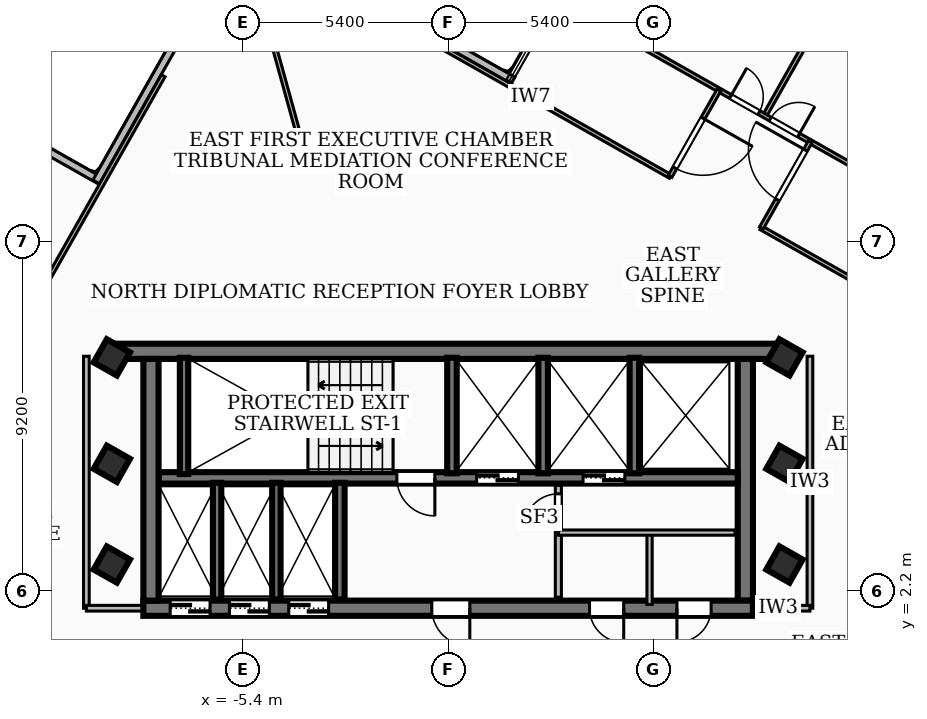
"""IFC4 building model, lengths in metres.
Left out: names, types, materials, properties, quantities, classifications, styles, units other than length and angle.
Written with IfcOpenShell. Run it as: python <this file> out.ifc"""

import sys

from ifc_helpers import new_model, si_unit, direction, frame, frame_2d, origin, origin_2d, place, context, subcontext, project, spatial, rectangle, extrude, element, fill, save


model = new_model("IFC4")
c1 = context("Model", 3, precision=1e-05, world=origin(), true_north=direction((0.0, 1.0)))
c2 = subcontext(c1, "Body", "Model", "MODEL_VIEW")
j1 = project(units=[si_unit("LENGTHUNIT", "METRE"), si_unit("PLANEANGLEUNIT", "RADIAN")], contexts=[c1])
p1 = place(None, origin())
s1 = spatial("IfcSite", under=j1, at=p1, CompositionType="ELEMENT")
p2 = place(p1, origin())
s2 = spatial("IfcBuilding", under=s1, at=p2, CompositionType="ELEMENT")
p3 = place(p2, frame((0.0, 0.0, 281.7)))
s3 = spatial("IfcBuildingStorey", under=s2, at=p3, CompositionType="ELEMENT", Elevation=281.7)
p4 = place(p3, frame((-8.78, 8.51, 0.0), z_axis=(0.0, 0.0, 1.0), x_axis=(1.0, 0.0, 0.0)))
e1 = element("IfcWall", 1, at=p4, inside=s3, PredefinedType="SHEAR", context=c2, shape_type="SweptSolid", body=[
    extrude(rectangle(XDim=17.56, YDim=0.4, at=frame_2d((8.78, 0.0))), origin(), (0.0, 0.0, 1.0), 3.12),
])
p5 = place(p3, frame((8.02, 1.75, 0.0), z_axis=(0.0, 0.0, 1.0), x_axis=(-1.0, 0.0, 0.0)))
e2 = element("IfcWall", 2, at=p5, inside=s3, PredefinedType="SHEAR", context=c2, shape_type="SweptSolid", body=[
    extrude(rectangle(XDim=16.04, YDim=0.4, at=frame_2d((8.02, 0.0))), origin(), (0.0, 0.0, 1.0), 3.12),
])
p6 = place(p5, frame((7.45, 0.0, 0.0)))
e3 = element("IfcOpeningElement", 3, at=p6, cuts=e2, PredefinedType="OPENING", context=c2, shape_type="SweptSolid", body=[
    extrude(rectangle(XDim=1.0, YDim=2.1, at=frame_2d((0.5, 1.05))), frame((0.0, 0.21, 0.0), z_axis=(0.0, -1.0, 0.0), x_axis=(1.0, 0.0, 0.0)), (0.0, 0.0, 1.0), 0.42),
])
p7 = place(p5, frame((14.285, 0.0, 0.0)))
e4 = element("IfcOpeningElement", 4, at=p7, cuts=e2, PredefinedType="OPENING", context=c2, shape_type="SweptSolid", body=[
    extrude(rectangle(XDim=1.05, YDim=2.15, at=frame_2d((0.525, 1.075))), frame((0.0, 0.21, 0.0), z_axis=(0.0, -1.0, 0.0), x_axis=(1.0, 0.0, 0.0)), (0.0, 0.0, 1.0), 0.42),
])
p8 = place(p5, frame((12.725, 0.0, 0.0)))
e5 = element("IfcOpeningElement", 5, at=p8, cuts=e2, PredefinedType="OPENING", context=c2, shape_type="SweptSolid", body=[
    extrude(rectangle(XDim=1.05, YDim=2.15, at=frame_2d((0.525, 1.075))), frame((0.0, 0.21, 0.0), z_axis=(0.0, -1.0, 0.0), x_axis=(1.0, 0.0, 0.0)), (0.0, 0.0, 1.0), 0.42),
])
p9 = place(p5, frame((11.165, 0.0, 0.0)))
e6 = element("IfcOpeningElement", 6, at=p9, cuts=e2, PredefinedType="OPENING", context=c2, shape_type="SweptSolid", body=[
    extrude(rectangle(XDim=1.05, YDim=2.15, at=frame_2d((0.525, 1.075))), frame((0.0, 0.21, 0.0), z_axis=(0.0, -1.0, 0.0), x_axis=(1.0, 0.0, 0.0)), (0.0, 0.0, 1.0), 0.42),
])
p10 = place(p5, frame((3.4, 0.0, 0.0)))
e7 = element("IfcOpeningElement", 7, at=p10, cuts=e2, PredefinedType="OPENING", context=c2, shape_type="SweptSolid", body=[
    extrude(rectangle(XDim=0.9, YDim=2.06, at=frame_2d((0.45, 1.03))), frame((0.0, 0.21, 0.0), z_axis=(0.0, -1.0, 0.0), x_axis=(1.0, 0.0, 0.0)), (0.0, 0.0, 1.0), 0.42),
])
p11 = place(p5, frame((1.1, 0.0, 0.0)))
e8 = element("IfcOpeningElement", 8, at=p11, cuts=e2, PredefinedType="OPENING", context=c2, shape_type="SweptSolid", body=[
    extrude(rectangle(XDim=0.9, YDim=2.06, at=frame_2d((0.45, 1.03))), frame((0.0, 0.21, 0.0), z_axis=(0.0, -1.0, 0.0), x_axis=(1.0, 0.0, 0.0)), (0.0, 0.0, 1.0), 0.42),
])
for number, where, z_axis, x_axis in (
    (9, (-7.82, 1.95, 0.0), (0.0, 0.0, 1.0), (0.0, 1.0, 0.0)),
    (10, (7.82, 8.31, 0.0), (0.0, 0.0, 1.0), (0.0, -1.0, 0.0)),
):
    element("IfcWall", number, at=place(p3, frame(where, z_axis=z_axis, x_axis=x_axis)), inside=s3, PredefinedType="SHEAR", context=c2, shape_type="SweptSolid", body=[
        extrude(rectangle(XDim=6.36, YDim=0.4, at=frame_2d((3.18, 0.0))), origin(), (0.0, 0.0, 1.0), 3.12),
    ])
p12 = place(p3, frame((7.62, 5.18, 0.0), z_axis=(0.0, 0.0, 1.0), x_axis=(-1.0, 0.0, 0.0)))
e11 = element("IfcWall", 11, at=p12, inside=s3, PredefinedType="SOLIDWALL", context=c2, shape_type="SweptSolid", body=[
    extrude(rectangle(XDim=15.24, YDim=0.3, at=frame_2d((7.62, 0.0))), origin(), (0.0, 0.0, 1.0), 3.12),
])
p13 = place(p12, frame((5.77, 0.0, 0.0)))
e12 = element("IfcOpeningElement", 12, at=p13, cuts=e11, PredefinedType="OPENING", context=c2, shape_type="SweptSolid", body=[
    extrude(rectangle(XDim=1.1, YDim=2.15, at=frame_2d((0.55, 1.075))), frame((0.0, 0.16, 0.0), z_axis=(0.0, -1.0, 0.0), x_axis=(1.0, 0.0, 0.0)), (0.0, 0.0, 1.0), 0.32),
])
p14 = place(p12, frame((2.97, 0.0, 0.0)))
e13 = element("IfcOpeningElement", 13, at=p14, cuts=e11, PredefinedType="OPENING", context=c2, shape_type="SweptSolid", body=[
    extrude(rectangle(XDim=1.1, YDim=2.15, at=frame_2d((0.55, 1.075))), frame((0.0, 0.16, 0.0), z_axis=(0.0, -1.0, 0.0), x_axis=(1.0, 0.0, 0.0)), (0.0, 0.0, 1.0), 0.32),
])
p15 = place(p12, frame((7.97, 0.0, 0.0)))
e14 = element("IfcOpeningElement", 14, at=p15, cuts=e11, PredefinedType="OPENING", context=c2, shape_type="SweptSolid", body=[
    extrude(rectangle(XDim=1.0, YDim=2.1, at=frame_2d((0.5, 1.05))), frame((0.0, 0.16, 0.0), z_axis=(0.0, -1.0, 0.0), x_axis=(1.0, 0.0, 0.0)), (0.0, 0.0, 1.0), 0.32),
])
p16 = place(p3, frame((-6.95, 5.28, 0.0), z_axis=(0.0, 0.0, 1.0), x_axis=(0.0, 1.0, 0.0)))
e15 = element("IfcWall", 15, at=p16, inside=s3, PredefinedType="SOLIDWALL", context=c2, shape_type="SweptSolid", body=[
    extrude(rectangle(XDim=3.06, YDim=0.22, at=frame_2d((1.53, 0.0))), origin(), (0.0, 0.0, 1.0), 3.12),
])
for number, where, z_axis, x_axis in (
    (16, (0.1, 5.3, 0.0), (0.0, 0.0, 1.0), (0.0, 1.0, 0.0)),
    (17, (2.5, 5.3, 0.0), (0.0, 0.0, 1.0), (0.0, 1.0, 0.0)),
    (18, (4.9, 5.3, 0.0), (0.0, 0.0, 1.0), (0.0, 1.0, 0.0)),
):
    element("IfcWall", number, at=place(p3, frame(where, z_axis=z_axis, x_axis=x_axis)), inside=s3, PredefinedType="SOLIDWALL", context=c2, shape_type="SweptSolid", body=[
        extrude(rectangle(XDim=3.04, YDim=0.25, at=frame_2d((1.52, 0.0))), origin(), (0.0, 0.0, 1.0), 3.12),
    ])
p17 = place(p3, frame((-2.85, 1.98, 0.0), z_axis=(0.0, 0.0, 1.0), x_axis=(0.0, 1.0, 0.0)))
e19 = element("IfcWall", 19, at=p17, inside=s3, PredefinedType="SOLIDWALL", context=c2, shape_type="SweptSolid", body=[
    extrude(rectangle(XDim=3.07, YDim=0.25, at=frame_2d((1.535, 0.0))), origin(), (0.0, 0.0, 1.0), 3.12),
])
for number, where, z_axis, x_axis in (
    (20, (-6.08, 1.98, 0.0), (0.0, 0.0, 1.0), (0.0, 1.0, 0.0)),
    (21, (-4.52, 1.98, 0.0), (0.0, 0.0, 1.0), (0.0, 1.0, 0.0)),
):
    element("IfcWall", number, at=place(p3, frame(where, z_axis=z_axis, x_axis=x_axis)), inside=s3, PredefinedType="SOLIDWALL", context=c2, shape_type="SweptSolid", body=[
        extrude(rectangle(XDim=3.07, YDim=0.22, at=frame_2d((1.535, 0.0))), origin(), (0.0, 0.0, 1.0), 3.12),
    ])
for number, where, z_axis, x_axis in (
    (22, (-8.85, 2.9, 0.0), (0.0, 0.0, 1.0), (0.493, 0.87, 0.0)),
    (23, (-8.85, 5.55, 0.0), (0.0, 0.0, 1.0), (0.493, 0.87, 0.0)),
    (24, (8.85, 2.9, 0.0), (0.0, 0.0, 1.0), (0.493, 0.87, 0.0)),
    (25, (8.85, 5.55, 0.0), (0.0, 0.0, 1.0), (0.493, 0.87, 0.0)),
    (26, (-8.85, 8.35, 0.0), (0.0, 0.0, 1.0), (0.493, 0.87, 0.0)),
    (27, (8.85, 8.35, 0.0), (0.0, 0.0, 1.0), (0.493, 0.87, 0.0)),
):
    element("IfcColumn", number, at=place(p3, frame(where, z_axis=z_axis, x_axis=x_axis)), inside=s3, PredefinedType="COLUMN", context=c2, shape_type="SweptSolid", body=[
        extrude(rectangle(XDim=0.7, YDim=0.7, at=origin_2d()), origin(), (0.0, 0.0, 1.0), 3.42),
    ])
p18 = place(p3, frame((-12.323, 14.792, 0.0), z_axis=(0.0, 0.0, 1.0), x_axis=(0.870412972764, -0.492322309918, 0.0)))
e28 = element("IfcWall", 28, at=p18, inside=s3, PredefinedType="SOLIDWALL", context=c2, shape_type="SweptSolid", body=[
    extrude(rectangle(XDim=3.642, YDim=0.2, at=frame_2d((1.821, 0.0))), origin(), (0.0, 0.0, 1.0), 3.12),
])
p19 = place(p3, frame((-9.262, 12.968, 0.0), z_axis=(0.0, 0.0, 1.0), x_axis=(0.492583125855, 0.87026539867, 0.0)))
e29 = element("IfcWall", 29, at=p19, inside=s3, PredefinedType="SOLIDWALL", context=c2, shape_type="SweptSolid", body=[
    extrude(rectangle(XDim=6.24, YDim=0.2, at=frame_2d((3.12, 0.0))), origin(), (0.0, 0.0, 1.0), 3.12),
])
p20 = place(p3, frame((-4.16, 18.96, 0.0), z_axis=(0.0, 0.0, 1.0), x_axis=(0.870345588147, -0.492441425139, 0.0)))
e30 = element("IfcWall", 30, at=p20, inside=s3, PredefinedType="SOLIDWALL", context=c2, shape_type="SweptSolid", body=[
    extrude(rectangle(XDim=6.742, YDim=0.2, at=frame_2d((3.371, 0.0))), origin(), (0.0, 0.0, 1.0), 3.12),
])
p21 = place(p3, frame((2.9, 2.04, 0.0), z_axis=(0.0, 0.0, 1.0), x_axis=(0.0, 1.0, 0.0)))
e31 = element("IfcWall", 31, at=p21, inside=s3, PredefinedType="PARTITIONING", context=c2, shape_type="SweptSolid", body=[
    extrude(rectangle(XDim=2.94, YDim=0.16, at=frame_2d((1.47, 0.0))), origin(), (0.0, 0.0, 1.0), 2.35),
])
p22 = place(p21, frame((1.82, 0.0, 0.0)))
e32 = element("IfcOpeningElement", 32, at=p22, cuts=e31, PredefinedType="OPENING", context=c2, shape_type="SweptSolid", body=[
    extrude(rectangle(XDim=0.9, YDim=2.06, at=frame_2d((0.45, 1.03))), frame((0.0, 0.09, 0.0), z_axis=(0.0, -1.0, 0.0), x_axis=(1.0, 0.0, 0.0)), (0.0, 0.0, 1.0), 0.18),
])
p23 = place(p3, frame((2.9, 3.74, 0.0), z_axis=(0.0, 0.0, 1.0), x_axis=(1.0, 0.0, 0.0)))
e33 = element("IfcWall", 33, at=p23, inside=s3, PredefinedType="PARTITIONING", context=c2, shape_type="SweptSolid", body=[
    extrude(rectangle(XDim=4.65, YDim=0.138, at=frame_2d((2.325, 0.0))), origin(), (0.0, 0.0, 1.0), 3.12),
])
p24 = place(p3, frame((5.3, 1.85, 0.0), z_axis=(0.0, 0.0, 1.0), x_axis=(0.0, 1.0, 0.0)))
e34 = element("IfcWall", 34, at=p24, inside=s3, PredefinedType="PARTITIONING", context=c2, shape_type="SweptSolid", body=[
    extrude(rectangle(XDim=1.89, YDim=0.138, at=frame_2d((0.945, 0.0))), origin(), (0.0, 0.0, 1.0), 2.35),
])
p25 = place(p3, frame((-9.52, 1.75, 0.0), z_axis=(0.0, 0.0, 1.0), x_axis=(0.0, 1.0, 0.0)))
e35 = element("IfcWall", 35, at=p25, inside=s3, PredefinedType="PARTITIONING", context=c2, shape_type="SweptSolid", body=[
    extrude(rectangle(XDim=6.63, YDim=0.15, at=frame_2d((3.315, 0.0))), origin(), (0.0, 0.0, 1.0), 2.49),
])
p26 = place(p3, frame((-7.85, 1.75, 0.0), z_axis=(0.0, 0.0, 1.0), x_axis=(-1.0, 0.0, 0.0)))
e36 = element("IfcWall", 36, at=p26, inside=s3, PredefinedType="PARTITIONING", context=c2, shape_type="SweptSolid", body=[
    extrude(rectangle(XDim=1.67, YDim=0.15, at=frame_2d((0.835, 0.0))), origin(), (0.0, 0.0, 1.0), 2.35),
])
p27 = place(p3, frame((9.52, 1.75, 0.0), z_axis=(0.0, 0.0, 1.0), x_axis=(0.0, 1.0, 0.0)))
e37 = element("IfcWall", 37, at=p27, inside=s3, PredefinedType="PARTITIONING", context=c2, shape_type="SweptSolid", body=[
    extrude(rectangle(XDim=6.63, YDim=0.15, at=frame_2d((3.315, 0.0))), origin(), (0.0, 0.0, 1.0), 3.12),
])
p28 = place(p3, frame((7.85, 1.75, 0.0), z_axis=(0.0, 0.0, 1.0), x_axis=(1.0, 0.0, 0.0)))
e38 = element("IfcWall", 38, at=p28, inside=s3, PredefinedType="PARTITIONING", context=c2, shape_type="SweptSolid", body=[
    extrude(rectangle(XDim=1.67, YDim=0.15, at=frame_2d((0.835, 0.0))), origin(), (0.0, 0.0, 1.0), 2.35),
])
p29 = place(p3, frame((-3.75, 13.54, 0.0), z_axis=(0.0, 0.0, 1.0), x_axis=(-0.266822842302, 0.963745594452, 0.0)))
e39 = element("IfcWall", 39, at=p29, inside=s3, PredefinedType="PARTITIONING", context=c2, shape_type="SweptSolid", body=[
    extrude(rectangle(XDim=5.645, YDim=0.11, at=frame_2d((2.822, 0.0))), origin(), (0.0, 0.0, 1.0), 3.12),
])
p30 = place(p3, frame((5.849, 13.11, 0.0), z_axis=(0.0, 0.0, 1.0), x_axis=(-0.870169207172, 0.49275303235, 0.0)))
e40 = element("IfcWall", 40, at=p30, inside=s3, PredefinedType="PARTITIONING", context=c2, shape_type="SweptSolid", body=[
    extrude(rectangle(XDim=8.45, YDim=0.11, at=frame_2d((4.225, 0.0))), origin(), (0.0, 0.0, 1.0), 3.12),
])
p31 = place(p3, frame((15.152, 7.843, 0.0), z_axis=(0.0, 0.0, 1.0), x_axis=(-0.87023152106, 0.492642973921, 0.0)))
e41 = element("IfcWall", 41, at=p31, inside=s3, PredefinedType="PARTITIONING", context=c2, shape_type="SweptSolid", body=[
    extrude(rectangle(XDim=7.951, YDim=0.11, at=frame_2d((3.976, 0.0))), origin(), (0.0, 0.0, 1.0), 2.49),
])
p32 = place(p3, frame((7.126, 15.386, 0.0), z_axis=(0.0, 0.0, 1.0), x_axis=(-0.492719860856, -0.870187990447, 0.0)))
e42 = element("IfcWall", 42, at=p32, inside=s3, PredefinedType="PARTITIONING", context=c2, shape_type="SweptSolid", body=[
    extrude(rectangle(XDim=2.61, YDim=0.11, at=frame_2d((1.305, 0.0))), origin(), (0.0, 0.0, 1.0), 3.12),
])
p33 = place(p32, frame((0.855, 0.0, 0.0)))
e43 = element("IfcOpeningElement", 43, at=p33, cuts=e42, PredefinedType="OPENING", context=c2, shape_type="SweptSolid", body=[
    extrude(rectangle(XDim=1.5, YDim=2.12, at=frame_2d((0.75, 1.06))), frame((0.0, 0.065, 0.0), z_axis=(0.0, -1.0, 0.0), x_axis=(1.0, 0.0, 0.0)), (0.0, 0.0, 1.0), 0.13),
])
p34 = place(p3, frame((8.242, 11.755, 0.0), z_axis=(0.0, 0.0, 1.0), x_axis=(0.492790693409, 0.870147879667, 0.0)))
e44 = element("IfcWall", 44, at=p34, inside=s3, PredefinedType="PARTITIONING", context=c2, shape_type="SweptSolid", body=[
    extrude(rectangle(XDim=2.61, YDim=0.11, at=frame_2d((1.305, 0.0))), origin(), (0.0, 0.0, 1.0), 2.49),
])
p35 = place(p34, frame((0.855, 0.0, 0.0)))
e45 = element("IfcOpeningElement", 45, at=p35, cuts=e44, PredefinedType="OPENING", context=c2, shape_type="SweptSolid", body=[
    extrude(rectangle(XDim=1.5, YDim=2.12, at=frame_2d((0.75, 1.06))), frame((0.0, 0.065, 0.0), z_axis=(0.0, -1.0, 0.0), x_axis=(1.0, 0.0, 0.0)), (0.0, 0.0, 1.0), 0.13),
])
p36 = place(p3, frame((8.357, 14.758, 0.0), z_axis=(0.0, 0.0, 1.0), x_axis=(0.492600685366, 0.870255459493, 0.0)))
e46 = element("IfcWall", 46, at=p36, inside=s3, PredefinedType="PARTITIONING", context=c2, shape_type="SweptSolid", body=[
    extrude(rectangle(XDim=7.075, YDim=0.11, at=frame_2d((3.538, 0.0))), origin(), (0.0, 0.0, 1.0), 2.49),
])
p37 = place(p3, frame((2.902, 17.778, 0.0), z_axis=(0.0, 0.0, 1.0), x_axis=(0.870194117035, -0.492709040588, 0.0)))
e47 = element("IfcWall", 47, at=p37, inside=s3, PredefinedType="PARTITIONING", context=c2, shape_type="SweptSolid", body=[
    extrude(rectangle(XDim=12.969, YDim=0.11, at=frame_2d((6.485, 0.0))), origin(), (0.0, 0.0, 1.0), 2.49),
])
p38 = place(p37, frame((6.405, 0.0, 0.0)))
e48 = element("IfcOpeningElement", 48, at=p38, cuts=e47, PredefinedType="OPENING", context=c2, shape_type="SweptSolid", body=[
    extrude(rectangle(XDim=0.86, YDim=2.04, at=frame_2d((0.43, 1.02))), frame((0.0, 0.065, 0.0), z_axis=(0.0, -1.0, 0.0), x_axis=(1.0, 0.0, 0.0)), (0.0, 0.0, 1.0), 0.13),
])
p39 = place(p37, frame((5.205, 0.0, 0.0)))
e49 = element("IfcOpeningElement", 49, at=p39, cuts=e47, PredefinedType="OPENING", context=c2, shape_type="SweptSolid", body=[
    extrude(rectangle(XDim=0.86, YDim=2.04, at=frame_2d((0.43, 1.02))), frame((0.0, 0.065, 0.0), z_axis=(0.0, -1.0, 0.0), x_axis=(1.0, 0.0, 0.0)), (0.0, 0.0, 1.0), 0.13),
])
p40 = place(p3, frame((-17.619, -2.113, 0.0), z_axis=(0.0, 0.0, 1.0), x_axis=(0.492746831558, 0.870172718482, 0.0)))
e50 = element("IfcWall", 50, at=p40, inside=s3, PredefinedType="PARTITIONING", context=c2, shape_type="SweptSolid", body=[
    extrude(rectangle(XDim=20.54, YDim=0.11, at=frame_2d((10.27, 0.0))), origin(), (0.0, 0.0, 1.0), 2.49),
])
p41 = place(p40, frame((11.36, 0.0, 0.0)))
e51 = element("IfcOpeningElement", 51, at=p41, cuts=e50, PredefinedType="OPENING", context=c2, shape_type="SweptSolid", body=[
    extrude(rectangle(XDim=0.86, YDim=2.04, at=frame_2d((0.43, 1.02))), frame((0.0, 0.065, 0.0), z_axis=(0.0, -1.0, 0.0), x_axis=(1.0, 0.0, 0.0)), (0.0, 0.0, 1.0), 0.13),
])
p42 = place(p40, frame((9.92, 0.0, 0.0)))
e52 = element("IfcOpeningElement", 52, at=p42, cuts=e50, PredefinedType="OPENING", context=c2, shape_type="SweptSolid", body=[
    extrude(rectangle(XDim=0.86, YDim=2.04, at=frame_2d((0.43, 1.02))), frame((0.0, 0.065, 0.0), z_axis=(0.0, -1.0, 0.0), x_axis=(1.0, 0.0, 0.0)), (0.0, 0.0, 1.0), 0.13),
])
p43 = place(p3, frame((17.619, 2.113, 0.0), z_axis=(0.0, 0.0, 1.0), x_axis=(-0.492746831558, -0.870172718482, 0.0)))
e53 = element("IfcWall", 53, at=p43, inside=s3, PredefinedType="PARTITIONING", context=c2, shape_type="SweptSolid", body=[
    extrude(rectangle(XDim=20.54, YDim=0.11, at=frame_2d((10.27, 0.0))), origin(), (0.0, 0.0, 1.0), 2.49),
])
p44 = place(p43, frame((11.36, 0.0, 0.0)))
e54 = element("IfcOpeningElement", 54, at=p44, cuts=e53, PredefinedType="OPENING", context=c2, shape_type="SweptSolid", body=[
    extrude(rectangle(XDim=0.86, YDim=2.04, at=frame_2d((0.43, 1.02))), frame((0.0, 0.065, 0.0), z_axis=(0.0, -1.0, 0.0), x_axis=(1.0, 0.0, 0.0)), (0.0, 0.0, 1.0), 0.13),
])
p45 = place(p43, frame((9.92, 0.0, 0.0)))
e55 = element("IfcOpeningElement", 55, at=p45, cuts=e53, PredefinedType="OPENING", context=c2, shape_type="SweptSolid", body=[
    extrude(rectangle(XDim=0.86, YDim=2.04, at=frame_2d((0.43, 1.02))), frame((0.0, 0.065, 0.0), z_axis=(0.0, -1.0, 0.0), x_axis=(1.0, 0.0, 0.0)), (0.0, 0.0, 1.0), 0.13),
])
p46 = place(p6, origin())
e56 = element("IfcDoor", 56, at=p46, inside=s3, OperationType="SINGLE_SWING_LEFT", PredefinedType="DOOR", context=c2, shape_type="SweptSolid", body=[
    extrude(rectangle(XDim=1.0, YDim=2.1, at=frame_2d((0.5, 1.05))), frame((0.0, 0.025, 0.0), z_axis=(0.0, -1.0, 0.0), x_axis=(1.0, 0.0, 0.0)), (0.0, 0.0, 1.0), 0.05),
])
fill(e3, e56)
p47 = place(p13, origin())
e57 = element("IfcDoor", 57, at=p47, inside=s3, OperationType="DOUBLE_DOOR_SLIDING", PredefinedType="DOOR", context=c2, shape_type="SweptSolid", body=[
    extrude(rectangle(XDim=1.1, YDim=2.15, at=frame_2d((0.55, 1.075))), frame((0.0, 0.025, 0.0), z_axis=(0.0, -1.0, 0.0), x_axis=(1.0, 0.0, 0.0)), (0.0, 0.0, 1.0), 0.05),
])
fill(e12, e57)
p48 = place(p14, origin())
e58 = element("IfcDoor", 58, at=p48, inside=s3, OperationType="DOUBLE_DOOR_SLIDING", PredefinedType="DOOR", context=c2, shape_type="SweptSolid", body=[
    extrude(rectangle(XDim=1.1, YDim=2.15, at=frame_2d((0.55, 1.075))), frame((0.0, 0.025, 0.0), z_axis=(0.0, -1.0, 0.0), x_axis=(1.0, 0.0, 0.0)), (0.0, 0.0, 1.0), 0.05),
])
fill(e13, e58)
p49 = place(p15, origin())
e59 = element("IfcDoor", 59, at=p49, inside=s3, OperationType="SINGLE_SWING_LEFT", PredefinedType="DOOR", context=c2, shape_type="SweptSolid", body=[
    extrude(rectangle(XDim=1.0, YDim=2.1, at=frame_2d((0.5, 1.05))), frame((0.0, 0.025, 0.0), z_axis=(0.0, -1.0, 0.0), x_axis=(1.0, 0.0, 0.0)), (0.0, 0.0, 1.0), 0.05),
])
fill(e14, e59)
p50 = place(p7, origin())
e60 = element("IfcDoor", 60, at=p50, inside=s3, OperationType="DOUBLE_DOOR_SLIDING", PredefinedType="DOOR", context=c2, shape_type="SweptSolid", body=[
    extrude(rectangle(XDim=1.05, YDim=2.15, at=frame_2d((0.525, 1.075))), frame((0.0, 0.025, 0.0), z_axis=(0.0, -1.0, 0.0), x_axis=(1.0, 0.0, 0.0)), (0.0, 0.0, 1.0), 0.05),
])
fill(e4, e60)
p51 = place(p8, origin())
e61 = element("IfcDoor", 61, at=p51, inside=s3, OperationType="DOUBLE_DOOR_SLIDING", PredefinedType="DOOR", context=c2, shape_type="SweptSolid", body=[
    extrude(rectangle(XDim=1.05, YDim=2.15, at=frame_2d((0.525, 1.075))), frame((0.0, 0.025, 0.0), z_axis=(0.0, -1.0, 0.0), x_axis=(1.0, 0.0, 0.0)), (0.0, 0.0, 1.0), 0.05),
])
fill(e5, e61)
p52 = place(p9, origin())
e62 = element("IfcDoor", 62, at=p52, inside=s3, OperationType="DOUBLE_DOOR_SLIDING", PredefinedType="DOOR", context=c2, shape_type="SweptSolid", body=[
    extrude(rectangle(XDim=1.05, YDim=2.15, at=frame_2d((0.525, 1.075))), frame((0.0, 0.025, 0.0), z_axis=(0.0, -1.0, 0.0), x_axis=(1.0, 0.0, 0.0)), (0.0, 0.0, 1.0), 0.05),
])
fill(e6, e62)
p53 = place(p10, origin())
e63 = element("IfcDoor", 63, at=p53, inside=s3, OperationType="SINGLE_SWING_LEFT", PredefinedType="DOOR", context=c2, shape_type="SweptSolid", body=[
    extrude(rectangle(XDim=0.9, YDim=2.06, at=frame_2d((0.45, 1.03))), frame((0.0, 0.025, 0.0), z_axis=(0.0, -1.0, 0.0), x_axis=(1.0, 0.0, 0.0)), (0.0, 0.0, 1.0), 0.05),
])
fill(e7, e63)
p54 = place(p11, origin())
e64 = element("IfcDoor", 64, at=p54, inside=s3, OperationType="SINGLE_SWING_RIGHT", PredefinedType="DOOR", context=c2, shape_type="SweptSolid", body=[
    extrude(rectangle(XDim=0.9, YDim=2.06, at=frame_2d((0.45, 1.03))), frame((0.0, 0.025, 0.0), z_axis=(0.0, -1.0, 0.0), x_axis=(1.0, 0.0, 0.0)), (0.0, 0.0, 1.0), 0.05),
])
fill(e8, e64)
p55 = place(p22, origin())
e65 = element("IfcDoor", 65, at=p55, inside=s3, OperationType="SINGLE_SWING_LEFT", PredefinedType="DOOR", context=c2, shape_type="SweptSolid", body=[
    extrude(rectangle(XDim=0.9, YDim=2.06, at=frame_2d((0.45, 1.03))), frame((0.0, 0.025, 0.0), z_axis=(0.0, -1.0, 0.0), x_axis=(1.0, 0.0, 0.0)), (0.0, 0.0, 1.0), 0.05),
])
fill(e32, e65)
p56 = place(p33, origin())
e66 = element("IfcDoor", 66, at=p56, inside=s3, OperationType="SINGLE_SWING_LEFT", PredefinedType="DOOR", context=c2, shape_type="SweptSolid", body=[
    extrude(rectangle(XDim=1.5, YDim=2.12, at=frame_2d((0.75, 1.06))), frame((0.0, 0.025, 0.0), z_axis=(0.0, -1.0, 0.0), x_axis=(1.0, 0.0, 0.0)), (0.0, 0.0, 1.0), 0.05),
])
fill(e43, e66)
p57 = place(p35, origin())
e67 = element("IfcDoor", 67, at=p57, inside=s3, OperationType="SINGLE_SWING_RIGHT", PredefinedType="DOOR", context=c2, shape_type="SweptSolid", body=[
    extrude(rectangle(XDim=1.5, YDim=2.12, at=frame_2d((0.75, 1.06))), frame((0.0, 0.025, 0.0), z_axis=(0.0, -1.0, 0.0), x_axis=(1.0, 0.0, 0.0)), (0.0, 0.0, 1.0), 0.05),
])
fill(e45, e67)
p58 = place(p38, origin())
e68 = element("IfcDoor", 68, at=p58, inside=s3, OperationType="SINGLE_SWING_RIGHT", PredefinedType="DOOR", context=c2, shape_type="SweptSolid", body=[
    extrude(rectangle(XDim=0.86, YDim=2.04, at=frame_2d((0.43, 1.02))), frame((0.0, 0.025, 0.0), z_axis=(0.0, -1.0, 0.0), x_axis=(1.0, 0.0, 0.0)), (0.0, 0.0, 1.0), 0.05),
])
fill(e48, e68)
p59 = place(p39, origin())
e69 = element("IfcDoor", 69, at=p59, inside=s3, OperationType="SINGLE_SWING_LEFT", PredefinedType="DOOR", context=c2, shape_type="SweptSolid", body=[
    extrude(rectangle(XDim=0.86, YDim=2.04, at=frame_2d((0.43, 1.02))), frame((0.0, 0.025, 0.0), z_axis=(0.0, -1.0, 0.0), x_axis=(1.0, 0.0, 0.0)), (0.0, 0.0, 1.0), 0.05),
])
fill(e49, e69)
save(model, sys.argv[1])
